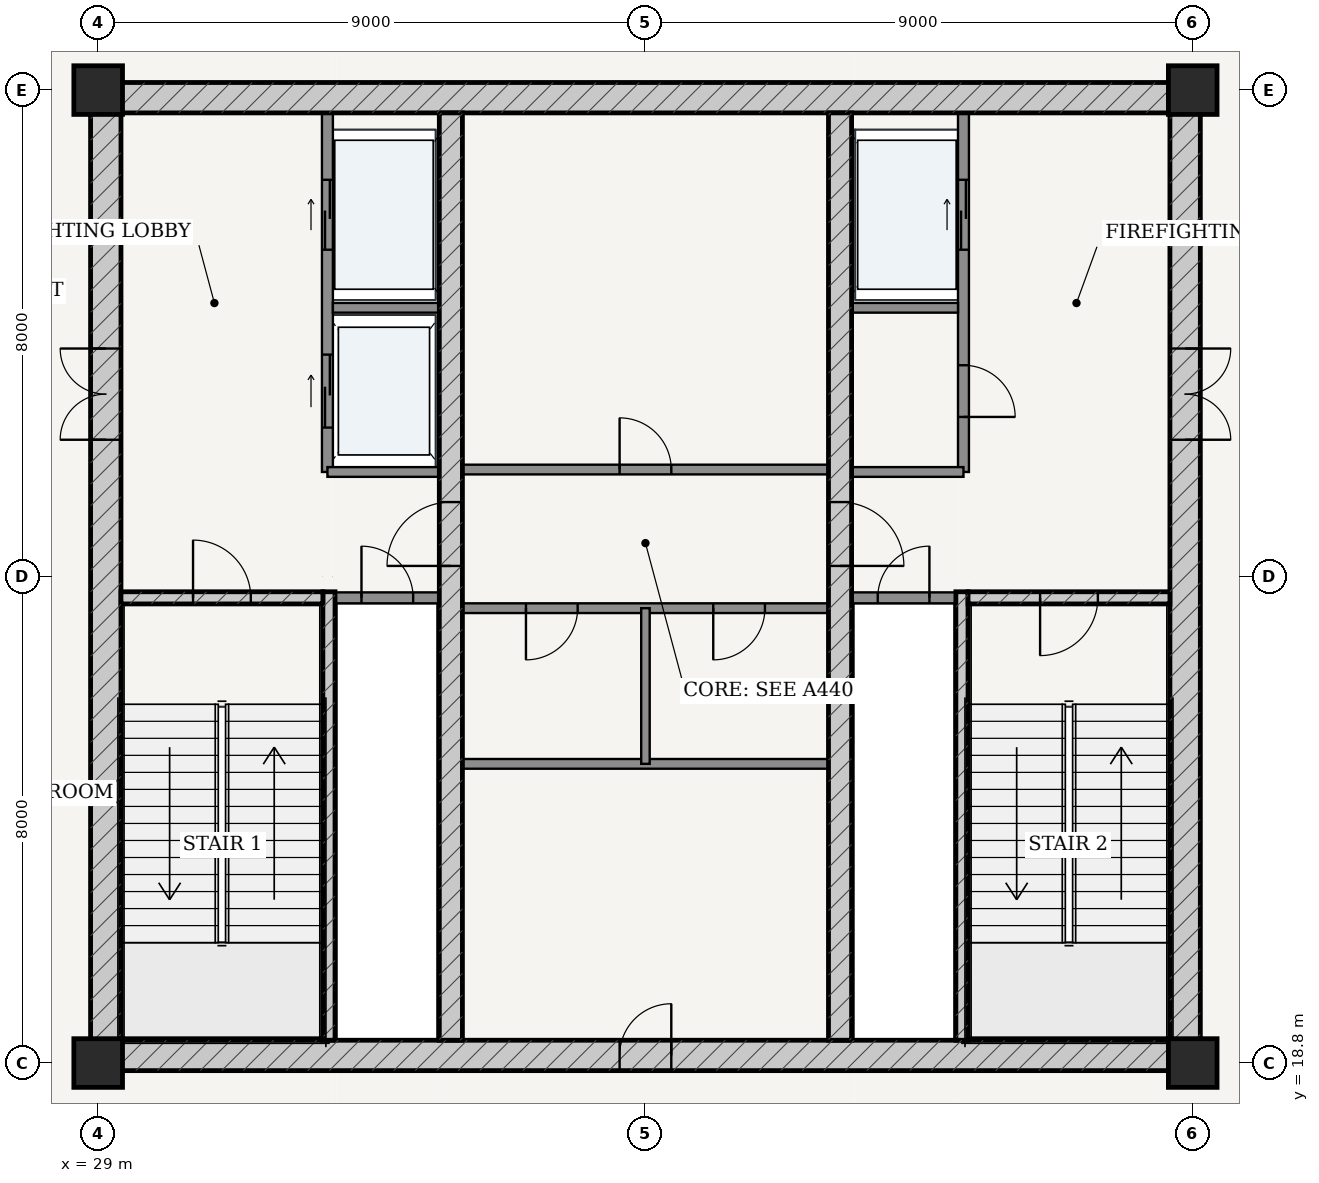
"""IFC4 building model, lengths in metres.
Left out: names, types, materials, properties, quantities, classifications, styles, units other than length and angle.
Written with IfcOpenShell. Run it as: python <this file> out.ifc"""

import sys

from ifc_helpers import new_model, si_unit, direction, frame, frame_2d, origin, origin_2d, place, context, subcontext, project, spatial, rectangle, extrude, source, transform, mapped, element, fill, save


model = new_model("IFC4")
c1 = context("Model", 3, precision=1e-05, world=origin(), true_north=direction((-0.2419218956, 0.970295726276)))
c2 = subcontext(c1, "Body", "Model", "MODEL_VIEW")
j1 = project(units=[si_unit("LENGTHUNIT", "METRE"), si_unit("PLANEANGLEUNIT", "RADIAN")], contexts=[c1])
p1 = place(None, origin())
s1 = spatial("IfcSite", under=j1, at=p1, CompositionType="ELEMENT")
p2 = place(p1, origin())
s2 = spatial("IfcBuilding", under=s1, at=p2, CompositionType="ELEMENT")
p3 = place(p2, frame((0.0, 0.0, 311.3)))
s3 = spatial("IfcBuildingStorey", under=s2, at=p3, CompositionType="ELEMENT", Elevation=311.3)
for number, where, z_axis, x_axis in (
    (1, (29.0, 18.8, 0.0), (0.0, 0.0, 1.0), (1.0, 0.0, 0.0)),
    (2, (47.0, 18.8, 0.0), (0.0, 0.0, 1.0), (1.0, 0.0, 0.0)),
    (3, (47.0, 34.8, 0.0), (0.0, 0.0, 1.0), (1.0, 0.0, 0.0)),
    (4, (29.0, 34.8, 0.0), (0.0, 0.0, 1.0), (1.0, 0.0, 0.0)),
):
    element("IfcColumn", number, at=place(p3, frame(where, z_axis=z_axis, x_axis=x_axis)), inside=s3, PredefinedType="COLUMN", context=c2, shape_type="SweptSolid", body=[
        extrude(rectangle(XDim=0.8, YDim=0.8, at=origin_2d()), origin(), (0.0, 0.0, 1.0), 5.2),
    ])
p4 = place(p3, frame((28.875, 18.925, 0.0), z_axis=(0.0, 0.0, 1.0), x_axis=(1.0, 0.0, 0.0)))
e5 = element("IfcWall", 5, at=p4, inside=s3, PredefinedType="SHEAR", context=c2, shape_type="SweptSolid", body=[
    extrude(rectangle(XDim=18.25, YDim=0.5, at=frame_2d((9.125, 0.0))), origin(), (0.0, 0.0, 1.0), 4.78),
])
p5 = place(p4, frame((8.7, 0.0, 0.0)))
e6 = element("IfcOpeningElement", 6, at=p5, cuts=e5, PredefinedType="OPENING", context=c2, shape_type="SweptSolid", body=[
    extrude(rectangle(XDim=0.85, YDim=2.1, at=frame_2d((0.425, 1.05))), frame((0.0, 0.26, 0.0), z_axis=(0.0, -1.0, 0.0), x_axis=(1.0, 0.0, 0.0)), (0.0, 0.0, 1.0), 0.52),
])
p6 = place(p3, frame((28.875, 34.675, 0.0), z_axis=(0.0, 0.0, 1.0), x_axis=(1.0, 0.0, 0.0)))
e7 = element("IfcWall", 7, at=p6, inside=s3, PredefinedType="SHEAR", context=c2, shape_type="SweptSolid", body=[
    extrude(rectangle(XDim=18.25, YDim=0.5, at=frame_2d((9.125, 0.0))), origin(), (0.0, 0.0, 1.0), 4.78),
])
p7 = place(p3, frame((29.125, 19.175, 0.0), z_axis=(0.0, 0.0, 1.0), x_axis=(0.0, 1.0, 0.0)))
e8 = element("IfcWall", 8, at=p7, inside=s3, PredefinedType="SHEAR", context=c2, shape_type="SweptSolid", body=[
    extrude(rectangle(XDim=15.25, YDim=0.5, at=frame_2d((7.625, 0.0))), origin(), (0.0, 0.0, 1.0), 4.78),
])
p8 = place(p7, frame((9.875, 0.0, 0.0)))
e9 = element("IfcOpeningElement", 9, at=p8, cuts=e8, PredefinedType="OPENING", context=c2, shape_type="SweptSolid", body=[
    extrude(rectangle(XDim=1.5, YDim=2.2, at=frame_2d((0.75, 1.1))), frame((0.0, 0.26, 0.0), z_axis=(0.0, -1.0, 0.0), x_axis=(1.0, 0.0, 0.0)), (0.0, 0.0, 1.0), 0.52),
])
p9 = place(p3, frame((46.875, 19.175, 0.0), z_axis=(0.0, 0.0, 1.0), x_axis=(0.0, 1.0, 0.0)))
e10 = element("IfcWall", 10, at=p9, inside=s3, PredefinedType="SHEAR", context=c2, shape_type="SweptSolid", body=[
    extrude(rectangle(XDim=15.25, YDim=0.5, at=frame_2d((7.625, 0.0))), origin(), (0.0, 0.0, 1.0), 4.78),
])
p10 = place(p9, frame((9.875, 0.0, 0.0)))
e11 = element("IfcOpeningElement", 11, at=p10, cuts=e10, PredefinedType="OPENING", context=c2, shape_type="SweptSolid", body=[
    extrude(rectangle(XDim=1.5, YDim=2.2, at=frame_2d((0.75, 1.1))), frame((0.0, 0.26, 0.0), z_axis=(0.0, -1.0, 0.0), x_axis=(1.0, 0.0, 0.0)), (0.0, 0.0, 1.0), 0.52),
])
p11 = place(p3, frame((32.795, 19.175, 0.0), z_axis=(0.0, 0.0, 1.0), x_axis=(0.0, 1.0, 0.0)))
e12 = element("IfcWall", 12, at=p11, inside=s3, PredefinedType="SOLIDWALL", context=c2, shape_type="SweptSolid", body=[
    extrude(rectangle(XDim=7.375, YDim=0.2, at=frame_2d((3.688, 0.0))), origin(), (0.0, 0.0, 1.0), 4.78),
])
p12 = place(p3, frame((29.375, 26.45, 0.0), z_axis=(0.0, 0.0, 1.0), x_axis=(1.0, 0.0, 0.0)))
e13 = element("IfcWall", 13, at=p12, inside=s3, PredefinedType="SOLIDWALL", context=c2, shape_type="SweptSolid", body=[
    extrude(rectangle(XDim=3.32, YDim=0.2, at=frame_2d((1.66, 0.0))), origin(), (0.0, 0.0, 1.0), 4.78),
])
p13 = place(p12, frame((1.185, 0.0, 0.0)))
e14 = element("IfcOpeningElement", 14, at=p13, cuts=e13, PredefinedType="OPENING", context=c2, shape_type="SweptSolid", body=[
    extrude(rectangle(XDim=0.95, YDim=2.15, at=frame_2d((0.475, 1.075))), frame((0.0, 0.11, 0.0), z_axis=(0.0, -1.0, 0.0), x_axis=(1.0, 0.0, 0.0)), (0.0, 0.0, 1.0), 0.22),
])
p14 = place(p3, frame((43.205, 19.175, 0.0), z_axis=(0.0, 0.0, 1.0), x_axis=(0.0, 1.0, 0.0)))
e15 = element("IfcWall", 15, at=p14, inside=s3, PredefinedType="SOLIDWALL", context=c2, shape_type="SweptSolid", body=[
    extrude(rectangle(XDim=7.375, YDim=0.2, at=frame_2d((3.688, 0.0))), origin(), (0.0, 0.0, 1.0), 4.78),
])
p15 = place(p3, frame((43.305, 26.45, 0.0), z_axis=(0.0, 0.0, 1.0), x_axis=(1.0, 0.0, 0.0)))
e16 = element("IfcWall", 16, at=p15, inside=s3, PredefinedType="SOLIDWALL", context=c2, shape_type="SweptSolid", body=[
    extrude(rectangle(XDim=3.32, YDim=0.2, at=frame_2d((1.66, 0.0))), origin(), (0.0, 0.0, 1.0), 4.78),
])
p16 = place(p15, frame((1.185, 0.0, 0.0)))
e17 = element("IfcOpeningElement", 17, at=p16, cuts=e16, PredefinedType="OPENING", context=c2, shape_type="SweptSolid", body=[
    extrude(rectangle(XDim=0.95, YDim=2.15, at=frame_2d((0.475, 1.075))), frame((0.0, 0.11, 0.0), z_axis=(0.0, -1.0, 0.0), x_axis=(1.0, 0.0, 0.0)), (0.0, 0.0, 1.0), 0.22),
])
p17 = place(p3, frame((34.8, 19.175, 0.0), z_axis=(0.0, 0.0, 1.0), x_axis=(0.0, 1.0, 0.0)))
e18 = element("IfcWall", 18, at=p17, inside=s3, PredefinedType="SHEAR", context=c2, shape_type="SweptSolid", body=[
    extrude(rectangle(XDim=15.25, YDim=0.38, at=frame_2d((7.625, 0.0))), origin(), (0.0, 0.0, 1.0), 4.78),
])
p18 = place(p17, frame((7.8, 0.0, 0.0)))
e19 = element("IfcOpeningElement", 19, at=p18, cuts=e18, PredefinedType="OPENING", context=c2, shape_type="SweptSolid", body=[
    extrude(rectangle(XDim=1.05, YDim=2.15, at=frame_2d((0.525, 1.075))), frame((0.0, 0.2, 0.0), z_axis=(0.0, -1.0, 0.0), x_axis=(1.0, 0.0, 0.0)), (0.0, 0.0, 1.0), 0.4),
])
p19 = place(p3, frame((41.2, 19.175, 0.0), z_axis=(0.0, 0.0, 1.0), x_axis=(0.0, 1.0, 0.0)))
e20 = element("IfcWall", 20, at=p19, inside=s3, PredefinedType="SHEAR", context=c2, shape_type="SweptSolid", body=[
    extrude(rectangle(XDim=15.25, YDim=0.38, at=frame_2d((7.625, 0.0))), origin(), (0.0, 0.0, 1.0), 4.78),
])
p20 = place(p19, frame((7.8, 0.0, 0.0)))
e21 = element("IfcOpeningElement", 21, at=p20, cuts=e20, PredefinedType="OPENING", context=c2, shape_type="SweptSolid", body=[
    extrude(rectangle(XDim=1.05, YDim=2.15, at=frame_2d((0.525, 1.075))), frame((0.0, 0.2, 0.0), z_axis=(0.0, -1.0, 0.0), x_axis=(1.0, 0.0, 0.0)), (0.0, 0.0, 1.0), 0.4),
])
p21 = place(p3, frame((32.9, 26.45, 0.0), z_axis=(0.0, 0.0, 1.0), x_axis=(1.0, 0.0, 0.0)))
e22 = element("IfcWall", 22, at=p21, inside=s3, PredefinedType="PARTITIONING", context=c2, shape_type="SweptSolid", body=[
    extrude(rectangle(XDim=1.71, YDim=0.18, at=frame_2d((0.855, 0.0))), origin(), (0.0, 0.0, 1.0), 4.78),
])
p22 = place(p21, frame((0.43, 0.0, 0.0)))
e23 = element("IfcOpeningElement", 23, at=p22, cuts=e22, PredefinedType="OPENING", context=c2, shape_type="SweptSolid", body=[
    extrude(rectangle(XDim=0.85, YDim=2.1, at=frame_2d((0.425, 1.05))), frame((0.0, 0.1, 0.0), z_axis=(0.0, -1.0, 0.0), x_axis=(1.0, 0.0, 0.0)), (0.0, 0.0, 1.0), 0.2),
])
p23 = place(p3, frame((41.39, 26.45, 0.0), z_axis=(0.0, 0.0, 1.0), x_axis=(1.0, 0.0, 0.0)))
e24 = element("IfcWall", 24, at=p23, inside=s3, PredefinedType="PARTITIONING", context=c2, shape_type="SweptSolid", body=[
    extrude(rectangle(XDim=1.71, YDim=0.18, at=frame_2d((0.855, 0.0))), origin(), (0.0, 0.0, 1.0), 4.78),
])
p24 = place(p23, frame((0.43, 0.0, 0.0)))
e25 = element("IfcOpeningElement", 25, at=p24, cuts=e24, PredefinedType="OPENING", context=c2, shape_type="SweptSolid", body=[
    extrude(rectangle(XDim=0.85, YDim=2.1, at=frame_2d((0.425, 1.05))), frame((0.0, 0.1, 0.0), z_axis=(0.0, -1.0, 0.0), x_axis=(1.0, 0.0, 0.0)), (0.0, 0.0, 1.0), 0.2),
])
p25 = place(p3, frame((32.77, 28.52, 0.0), z_axis=(0.0, 0.0, 1.0), x_axis=(0.0, 1.0, 0.0)))
e26 = element("IfcWall", 26, at=p25, inside=s3, PredefinedType="PARTITIONING", context=c2, shape_type="SweptSolid", body=[
    extrude(rectangle(XDim=5.905, YDim=0.18, at=frame_2d((2.953, 0.0))), origin(), (0.0, 0.0, 1.0), 4.78),
])
p26 = place(p25, frame((3.655, 0.0, 0.0)))
e27 = element("IfcOpeningElement", 27, at=p26, cuts=e26, PredefinedType="OPENING", context=c2, shape_type="SweptSolid", body=[
    extrude(rectangle(XDim=1.15, YDim=2.2, at=frame_2d((0.575, 1.1))), frame((0.0, 0.1, 0.0), z_axis=(0.0, -1.0, 0.0), x_axis=(1.0, 0.0, 0.0)), (0.0, 0.0, 1.0), 0.2),
])
p27 = place(p25, frame((0.73, 0.0, 0.0)))
e28 = element("IfcOpeningElement", 28, at=p27, cuts=e26, PredefinedType="OPENING", context=c2, shape_type="SweptSolid", body=[
    extrude(rectangle(XDim=1.2, YDim=2.25, at=frame_2d((0.6, 1.125))), frame((0.0, 0.1, 0.0), z_axis=(0.0, -1.0, 0.0), x_axis=(1.0, 0.0, 0.0)), (0.0, 0.0, 1.0), 0.2),
])
p28 = place(p3, frame((32.86, 31.22, 0.0), z_axis=(0.0, 0.0, 1.0), x_axis=(1.0, 0.0, 0.0)))
e29 = element("IfcWall", 29, at=p28, inside=s3, PredefinedType="PARTITIONING", context=c2, shape_type="SweptSolid", body=[
    extrude(rectangle(XDim=1.75, YDim=0.16, at=frame_2d((0.875, 0.0))), origin(), (0.0, 0.0, 1.0), 4.78),
])
p29 = place(p3, frame((32.77, 28.52, 0.0), z_axis=(0.0, 0.0, 1.0), x_axis=(1.0, 0.0, 0.0)))
e30 = element("IfcWall", 30, at=p29, inside=s3, PredefinedType="PARTITIONING", context=c2, shape_type="SweptSolid", body=[
    extrude(rectangle(XDim=1.84, YDim=0.16, at=frame_2d((0.92, 0.0))), origin(), (0.0, 0.0, 1.0), 4.78),
])
p30 = place(p3, frame((43.23, 28.52, 0.0), z_axis=(0.0, 0.0, 1.0), x_axis=(0.0, 1.0, 0.0)))
e31 = element("IfcWall", 31, at=p30, inside=s3, PredefinedType="PARTITIONING", context=c2, shape_type="SweptSolid", body=[
    extrude(rectangle(XDim=5.905, YDim=0.18, at=frame_2d((2.953, 0.0))), origin(), (0.0, 0.0, 1.0), 4.78),
])
p31 = place(p30, frame((0.905, 0.0, 0.0)))
e32 = element("IfcOpeningElement", 32, at=p31, cuts=e31, PredefinedType="OPENING", context=c2, shape_type="SweptSolid", body=[
    extrude(rectangle(XDim=0.85, YDim=2.1, at=frame_2d((0.425, 1.05))), frame((0.0, 0.1, 0.0), z_axis=(0.0, -1.0, 0.0), x_axis=(1.0, 0.0, 0.0)), (0.0, 0.0, 1.0), 0.2),
])
p32 = place(p30, frame((3.655, 0.0, 0.0)))
e33 = element("IfcOpeningElement", 33, at=p32, cuts=e31, PredefinedType="OPENING", context=c2, shape_type="SweptSolid", body=[
    extrude(rectangle(XDim=1.15, YDim=2.2, at=frame_2d((0.575, 1.1))), frame((0.0, 0.1, 0.0), z_axis=(0.0, -1.0, 0.0), x_axis=(1.0, 0.0, 0.0)), (0.0, 0.0, 1.0), 0.2),
])
p33 = place(p3, frame((41.39, 31.22, 0.0), z_axis=(0.0, 0.0, 1.0), x_axis=(1.0, 0.0, 0.0)))
e34 = element("IfcWall", 34, at=p33, inside=s3, PredefinedType="PARTITIONING", context=c2, shape_type="SweptSolid", body=[
    extrude(rectangle(XDim=1.75, YDim=0.16, at=frame_2d((0.875, 0.0))), origin(), (0.0, 0.0, 1.0), 4.78),
])
p34 = place(p3, frame((41.39, 28.52, 0.0), z_axis=(0.0, 0.0, 1.0), x_axis=(1.0, 0.0, 0.0)))
e35 = element("IfcWall", 35, at=p34, inside=s3, PredefinedType="PARTITIONING", context=c2, shape_type="SweptSolid", body=[
    extrude(rectangle(XDim=1.84, YDim=0.16, at=frame_2d((0.92, 0.0))), origin(), (0.0, 0.0, 1.0), 4.78),
])
p35 = place(p3, frame((34.99, 28.56, 0.0), z_axis=(0.0, 0.0, 1.0), x_axis=(1.0, 0.0, 0.0)))
e36 = element("IfcWall", 36, at=p35, inside=s3, PredefinedType="PARTITIONING", context=c2, shape_type="SweptSolid", body=[
    extrude(rectangle(XDim=6.02, YDim=0.16, at=frame_2d((3.01, 0.0))), origin(), (0.0, 0.0, 1.0), 4.78),
])
p36 = place(p35, frame((2.585, 0.0, 0.0)))
e37 = element("IfcOpeningElement", 37, at=p36, cuts=e36, PredefinedType="OPENING", context=c2, shape_type="SweptSolid", body=[
    extrude(rectangle(XDim=0.85, YDim=2.1, at=frame_2d((0.425, 1.05))), frame((0.0, 0.09, 0.0), z_axis=(0.0, -1.0, 0.0), x_axis=(1.0, 0.0, 0.0)), (0.0, 0.0, 1.0), 0.18),
])
p37 = place(p3, frame((34.99, 26.28, 0.0), z_axis=(0.0, 0.0, 1.0), x_axis=(1.0, 0.0, 0.0)))
e38 = element("IfcWall", 38, at=p37, inside=s3, PredefinedType="PARTITIONING", context=c2, shape_type="SweptSolid", body=[
    extrude(rectangle(XDim=6.02, YDim=0.16, at=frame_2d((3.01, 0.0))), origin(), (0.0, 0.0, 1.0), 4.78),
])
p38 = place(p37, frame((1.045, 0.0, 0.0)))
e39 = element("IfcOpeningElement", 39, at=p38, cuts=e38, PredefinedType="OPENING", context=c2, shape_type="SweptSolid", body=[
    extrude(rectangle(XDim=0.85, YDim=2.1, at=frame_2d((0.425, 1.05))), frame((0.0, 0.09, 0.0), z_axis=(0.0, -1.0, 0.0), x_axis=(1.0, 0.0, 0.0)), (0.0, 0.0, 1.0), 0.18),
])
p39 = place(p37, frame((4.125, 0.0, 0.0)))
e40 = element("IfcOpeningElement", 40, at=p39, cuts=e38, PredefinedType="OPENING", context=c2, shape_type="SweptSolid", body=[
    extrude(rectangle(XDim=0.85, YDim=2.1, at=frame_2d((0.425, 1.05))), frame((0.0, 0.09, 0.0), z_axis=(0.0, -1.0, 0.0), x_axis=(1.0, 0.0, 0.0)), (0.0, 0.0, 1.0), 0.18),
])
p40 = place(p3, frame((34.99, 23.72, 0.0), z_axis=(0.0, 0.0, 1.0), x_axis=(1.0, 0.0, 0.0)))
e41 = element("IfcWall", 41, at=p40, inside=s3, PredefinedType="PARTITIONING", context=c2, shape_type="SweptSolid", body=[
    extrude(rectangle(XDim=6.02, YDim=0.16, at=frame_2d((3.01, 0.0))), origin(), (0.0, 0.0, 1.0), 4.78),
])
p41 = place(p3, frame((38.0, 23.72, 0.0), z_axis=(0.0, 0.0, 1.0), x_axis=(0.0, 1.0, 0.0)))
e42 = element("IfcWall", 42, at=p41, inside=s3, PredefinedType="PARTITIONING", context=c2, shape_type="SweptSolid", body=[
    extrude(rectangle(XDim=2.56, YDim=0.14, at=frame_2d((1.28, 0.0))), origin(), (0.0, 0.0, 1.0), 4.78),
])
m1 = source(origin(), c2, "Body", "SweptSolid", [
    extrude(rectangle(XDim=1.5, YDim=2.2, at=frame_2d((0.75, 1.1))), frame((0.0, 0.025, 0.0), z_axis=(0.0, -1.0, 0.0), x_axis=(1.0, 0.0, 0.0)), (0.0, 0.0, 1.0), 0.05),
])
p42 = place(p8, origin())
e43 = element("IfcDoor", 43, at=p42, inside=s3, OperationType="DOUBLE_DOOR_SINGLE_SWING", PredefinedType="DOOR", context=c2, shape_type="MappedRepresentation", body=[
    mapped(m1, transform((0.0, 0.0, 0.0), scale=1.0)),
])
fill(e9, e43)
p43 = place(p10, frame((1.5, 0.0, 0.0), z_axis=(0.0, 0.0, 1.0), x_axis=(-1.0, 0.0, 0.0)))
e44 = element("IfcDoor", 44, at=p43, inside=s3, OperationType="DOUBLE_DOOR_SINGLE_SWING", PredefinedType="DOOR", context=c2, shape_type="MappedRepresentation", body=[
    mapped(m1, transform((0.0, 0.0, 0.0), scale=1.0)),
])
fill(e11, e44)
m2 = source(origin(), c2, "Body", "SweptSolid", [
    extrude(rectangle(XDim=1.05, YDim=2.15, at=frame_2d((0.525, 1.075))), frame((0.0, 0.025, 0.0), z_axis=(0.0, -1.0, 0.0), x_axis=(1.0, 0.0, 0.0)), (0.0, 0.0, 1.0), 0.05),
])
p44 = place(p18, origin())
e45 = element("IfcDoor", 45, at=p44, inside=s3, OperationType="SINGLE_SWING_LEFT", PredefinedType="DOOR", context=c2, shape_type="MappedRepresentation", body=[
    mapped(m2, transform((0.0, 0.0, 0.0), scale=1.0)),
])
fill(e19, e45)
p45 = place(p20, frame((1.05, 0.0, 0.0), z_axis=(0.0, 0.0, 1.0), x_axis=(-1.0, 0.0, 0.0)))
e46 = element("IfcDoor", 46, at=p45, inside=s3, OperationType="SINGLE_SWING_RIGHT", PredefinedType="DOOR", context=c2, shape_type="MappedRepresentation", body=[
    mapped(m2, transform((0.0, 0.0, 0.0), scale=1.0)),
])
fill(e21, e46)
m3 = source(origin(), c2, "Body", "SweptSolid", [
    extrude(rectangle(XDim=0.95, YDim=2.15, at=frame_2d((0.475, 1.075))), frame((0.0, 0.025, 0.0), z_axis=(0.0, -1.0, 0.0), x_axis=(1.0, 0.0, 0.0)), (0.0, 0.0, 1.0), 0.05),
])
p46 = place(p13, origin())
e47 = element("IfcDoor", 47, at=p46, inside=s3, OperationType="SINGLE_SWING_LEFT", PredefinedType="DOOR", context=c2, shape_type="MappedRepresentation", body=[
    mapped(m3, transform((0.0, 0.0, 0.0), scale=1.0)),
])
fill(e14, e47)
p47 = place(p16, frame((0.95, 0.0, 0.0), z_axis=(0.0, 0.0, 1.0), x_axis=(-1.0, 0.0, 0.0)))
e48 = element("IfcDoor", 48, at=p47, inside=s3, OperationType="SINGLE_SWING_RIGHT", PredefinedType="DOOR", context=c2, shape_type="MappedRepresentation", body=[
    mapped(m3, transform((0.0, 0.0, 0.0), scale=1.0)),
])
fill(e17, e48)
m4 = source(origin(), c2, "Body", "SweptSolid", [
    extrude(rectangle(XDim=0.85, YDim=2.1, at=frame_2d((0.425, 1.05))), frame((0.0, 0.025, 0.0), z_axis=(0.0, -1.0, 0.0), x_axis=(1.0, 0.0, 0.0)), (0.0, 0.0, 1.0), 0.05),
])
p48 = place(p22, origin())
e49 = element("IfcDoor", 49, at=p48, inside=s3, OperationType="SINGLE_SWING_LEFT", PredefinedType="DOOR", context=c2, shape_type="MappedRepresentation", body=[
    mapped(m4, transform((0.0, 0.0, 0.0), scale=1.0)),
])
fill(e23, e49)
p49 = place(p24, origin())
e50 = element("IfcDoor", 50, at=p49, inside=s3, OperationType="SINGLE_SWING_RIGHT", PredefinedType="DOOR", context=c2, shape_type="MappedRepresentation", body=[
    mapped(m4, transform((0.0, 0.0, 0.0), scale=1.0)),
])
fill(e25, e50)
p50 = place(p31, frame((0.85, 0.0, 0.0), z_axis=(0.0, 0.0, 1.0), x_axis=(-1.0, 0.0, 0.0)))
e51 = element("IfcDoor", 51, at=p50, inside=s3, OperationType="SINGLE_SWING_RIGHT", PredefinedType="DOOR", context=c2, shape_type="MappedRepresentation", body=[
    mapped(m4, transform((0.0, 0.0, 0.0), scale=1.0)),
])
fill(e32, e51)
p51 = place(p36, origin())
e52 = element("IfcDoor", 52, at=p51, inside=s3, OperationType="SINGLE_SWING_LEFT", PredefinedType="DOOR", context=c2, shape_type="MappedRepresentation", body=[
    mapped(m4, transform((0.0, 0.0, 0.0), scale=1.0)),
])
fill(e37, e52)
p52 = place(p38, frame((0.85, 0.0, 0.0), z_axis=(0.0, 0.0, 1.0), x_axis=(-1.0, 0.0, 0.0)))
e53 = element("IfcDoor", 53, at=p52, inside=s3, OperationType="SINGLE_SWING_RIGHT", PredefinedType="DOOR", context=c2, shape_type="MappedRepresentation", body=[
    mapped(m4, transform((0.0, 0.0, 0.0), scale=1.0)),
])
fill(e39, e53)
p53 = place(p39, frame((0.85, 0.0, 0.0), z_axis=(0.0, 0.0, 1.0), x_axis=(-1.0, 0.0, 0.0)))
e54 = element("IfcDoor", 54, at=p53, inside=s3, OperationType="SINGLE_SWING_RIGHT", PredefinedType="DOOR", context=c2, shape_type="MappedRepresentation", body=[
    mapped(m4, transform((0.0, 0.0, 0.0), scale=1.0)),
])
fill(e40, e54)
p54 = place(p5, origin())
e55 = element("IfcDoor", 55, at=p54, inside=s3, OperationType="SINGLE_SWING_RIGHT", PredefinedType="DOOR", context=c2, shape_type="MappedRepresentation", body=[
    mapped(m4, transform((0.0, 0.0, 0.0), scale=1.0)),
])
fill(e6, e55)
m5 = source(origin(), c2, "Body", "SweptSolid", [
    extrude(rectangle(XDim=1.15, YDim=2.2, at=frame_2d((0.575, 1.1))), frame((0.0, 0.025, 0.0), z_axis=(0.0, -1.0, 0.0), x_axis=(1.0, 0.0, 0.0)), (0.0, 0.0, 1.0), 0.05),
])
p55 = place(p26, origin())
e56 = element("IfcDoor", 56, at=p55, inside=s3, OperationType="DOUBLE_DOOR_SLIDING", PredefinedType="DOOR", context=c2, shape_type="MappedRepresentation", body=[
    mapped(m5, transform((0.0, 0.0, 0.0), scale=1.0)),
])
fill(e27, e56)
p56 = place(p32, origin())
e57 = element("IfcDoor", 57, at=p56, inside=s3, OperationType="DOUBLE_DOOR_SLIDING", PredefinedType="DOOR", context=c2, shape_type="MappedRepresentation", body=[
    mapped(m5, transform((0.0, 0.0, 0.0), scale=1.0)),
])
fill(e33, e57)
m6 = source(origin(), c2, "Body", "SweptSolid", [
    extrude(rectangle(XDim=1.2, YDim=2.25, at=frame_2d((0.6, 1.125))), frame((0.0, 0.025, 0.0), z_axis=(0.0, -1.0, 0.0), x_axis=(1.0, 0.0, 0.0)), (0.0, 0.0, 1.0), 0.05),
])
p57 = place(p27, origin())
e58 = element("IfcDoor", 58, at=p57, inside=s3, OperationType="DOUBLE_DOOR_SLIDING", PredefinedType="DOOR", context=c2, shape_type="MappedRepresentation", body=[
    mapped(m6, transform((0.0, 0.0, 0.0), scale=1.0)),
])
fill(e28, e58)
save(model, sys.argv[1])
